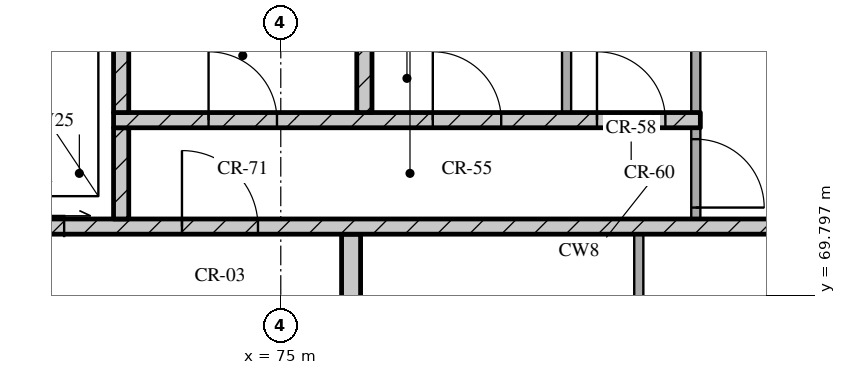
"""IFC4 building model, lengths in metres.
Left out: names, types, materials, properties, quantities, classifications, styles, units other than length and angle.
Written with IfcOpenShell. Run it as: python <this file> out.ifc"""

import sys

from ifc_helpers import new_model, si_unit, direction, frame, frame_2d, origin, place, context, subcontext, project, spatial, rectangle, extrude, element, fill, save


model = new_model("IFC4")
c1 = context("Model", 3, precision=1e-05, world=origin(), true_north=direction((0.0, 1.0)))
c2 = subcontext(c1, "Body", "Model", "MODEL_VIEW")
j1 = project(units=[si_unit("LENGTHUNIT", "METRE"), si_unit("PLANEANGLEUNIT", "RADIAN")], contexts=[c1])
p1 = place(None, origin())
s1 = spatial("IfcSite", under=j1, at=p1, CompositionType="ELEMENT")
p2 = place(p1, origin())
s2 = spatial("IfcBuilding", under=s1, at=p2, CompositionType="ELEMENT")
p3 = place(p2, frame((0.0, 0.0, 277.95)))
s3 = spatial("IfcBuildingStorey", under=s2, at=p3, CompositionType="ELEMENT", Elevation=277.95)
p4 = place(p3, frame((79.71, 68.0, 0.0), z_axis=(0.0, 0.0, 1.0), x_axis=(0.0, 1.0, 0.0)))
e1 = element("IfcWall", 1, at=p4, inside=s3, PredefinedType="PARTITIONING", context=c2, shape_type="SweptSolid", body=[
    extrude(rectangle(XDim=2.6, YDim=0.12, at=frame_2d((1.3, 0.0))), origin(), (0.0, 0.0, 1.0), 3.32),
])
p5 = place(p3, frame((75.925, 68.3, 0.0), z_axis=(0.0, 0.0, 1.0), x_axis=(0.0, 1.0, 0.0)))
e2 = element("IfcWall", 2, at=p5, inside=s3, PredefinedType="SOLIDWALL", context=c2, shape_type="SweptSolid", body=[
    extrude(rectangle(XDim=2.3, YDim=0.25, at=frame_2d((1.15, 0.0))), origin(), (0.0, 0.0, 1.0), 3.32),
])
p6 = place(p3, frame((67.8, 70.7, 0.0), z_axis=(0.0, 0.0, 1.0), x_axis=(1.0, 0.0, 0.0)))
e3 = element("IfcWall", 3, at=p6, inside=s3, PredefinedType="SOLIDWALL", context=c2, shape_type="SweptSolid", body=[
    extrude(rectangle(XDim=39.6, YDim=0.2, at=frame_2d((19.8, 0.0))), origin(), (0.0, 0.0, 1.0), 3.32),
])
p7 = place(p6, frame((0.65, 0.0, 0.0)))
e4 = element("IfcOpeningElement", 4, at=p7, cuts=e3, PredefinedType="OPENING", context=c2, shape_type="SweptSolid", body=[
    extrude(rectangle(XDim=1.1, YDim=2.1, at=frame_2d((0.55, 1.05))), frame((0.0, 0.11, 0.0), z_axis=(0.0, -1.0, 0.0), x_axis=(1.0, 0.0, 0.0)), (0.0, 0.0, 1.0), 0.22),
])
p8 = place(p6, frame((3.25, 0.0, 0.0)))
e5 = element("IfcOpeningElement", 5, at=p8, cuts=e3, PredefinedType="OPENING", context=c2, shape_type="SweptSolid", body=[
    extrude(rectangle(XDim=1.1, YDim=2.1, at=frame_2d((0.55, 1.05))), frame((0.0, 0.11, 0.0), z_axis=(0.0, -1.0, 0.0), x_axis=(1.0, 0.0, 0.0)), (0.0, 0.0, 1.0), 0.22),
])
p9 = place(p6, frame((5.9, 0.0, 0.0)))
e6 = element("IfcOpeningElement", 6, at=p9, cuts=e3, PredefinedType="OPENING", context=c2, shape_type="SweptSolid", body=[
    extrude(rectangle(XDim=1.0, YDim=2.1, at=frame_2d((0.5, 1.05))), frame((0.0, 0.11, 0.0), z_axis=(0.0, -1.0, 0.0), x_axis=(1.0, 0.0, 0.0)), (0.0, 0.0, 1.0), 0.22),
])
p10 = place(p6, frame((21.7, 0.0, 0.0)))
e7 = element("IfcOpeningElement", 7, at=p10, cuts=e3, PredefinedType="OPENING", context=c2, shape_type="SweptSolid", body=[
    extrude(rectangle(XDim=1.0, YDim=2.1, at=frame_2d((0.5, 1.05))), frame((0.0, 0.11, 0.0), z_axis=(0.0, -1.0, 0.0), x_axis=(1.0, 0.0, 0.0)), (0.0, 0.0, 1.0), 0.22),
])
p11 = place(p6, frame((32.7, 0.0, 0.0)))
e8 = element("IfcOpeningElement", 8, at=p11, cuts=e3, PredefinedType="OPENING", context=c2, shape_type="SweptSolid", body=[
    extrude(rectangle(XDim=1.0, YDim=2.1, at=frame_2d((0.5, 1.05))), frame((0.0, 0.11, 0.0), z_axis=(0.0, -1.0, 0.0), x_axis=(1.0, 0.0, 0.0)), (0.0, 0.0, 1.0), 0.22),
])
p12 = place(p6, frame((35.25, 0.0, 0.0)))
e9 = element("IfcOpeningElement", 9, at=p12, cuts=e3, PredefinedType="OPENING", context=c2, shape_type="SweptSolid", body=[
    extrude(rectangle(XDim=1.1, YDim=2.1, at=frame_2d((0.55, 1.05))), frame((0.0, 0.11, 0.0), z_axis=(0.0, -1.0, 0.0), x_axis=(1.0, 0.0, 0.0)), (0.0, 0.0, 1.0), 0.22),
])
p13 = place(p6, frame((37.85, 0.0, 0.0)))
e10 = element("IfcOpeningElement", 10, at=p13, cuts=e3, PredefinedType="OPENING", context=c2, shape_type="SweptSolid", body=[
    extrude(rectangle(XDim=1.1, YDim=2.1, at=frame_2d((0.55, 1.05))), frame((0.0, 0.11, 0.0), z_axis=(0.0, -1.0, 0.0), x_axis=(1.0, 0.0, 0.0)), (0.0, 0.0, 1.0), 0.22),
])
p14 = place(p3, frame((72.9, 70.8, 0.0), z_axis=(0.0, 0.0, 1.0), x_axis=(0.0, 1.0, 0.0)))
e11 = element("IfcWall", 11, at=p14, inside=s3, PredefinedType="SOLIDWALL", context=c2, shape_type="SweptSolid", body=[
    extrude(rectangle(XDim=1.2, YDim=0.2, at=frame_2d((0.6, 0.0))), origin(), (0.0, 0.0, 1.0), 3.32),
])
p15 = place(p3, frame((80.46, 70.8, 0.0), z_axis=(0.0, 0.0, 1.0), x_axis=(0.0, 1.0, 0.0)))
e12 = element("IfcWall", 12, at=p15, inside=s3, PredefinedType="PARTITIONING", context=c2, shape_type="SweptSolid", body=[
    extrude(rectangle(XDim=1.2, YDim=0.12, at=frame_2d((0.6, 0.0))), origin(), (0.0, 0.0, 1.0), 3.32),
])
p16 = place(p15, frame((0.15, 0.0, 0.0)))
e13 = element("IfcOpeningElement", 13, at=p16, cuts=e12, PredefinedType="OPENING", context=c2, shape_type="SweptSolid", body=[
    extrude(rectangle(XDim=0.9, YDim=2.1, at=frame_2d((0.45, 1.05))), frame((0.0, 0.07, 0.0), z_axis=(0.0, -1.0, 0.0), x_axis=(1.0, 0.0, 0.0)), (0.0, 0.0, 1.0), 0.14),
])
p17 = place(p3, frame((72.8, 72.1, 0.0), z_axis=(0.0, 0.0, 1.0), x_axis=(1.0, 0.0, 0.0)))
e14 = element("IfcWall", 14, at=p17, inside=s3, PredefinedType="SOLIDWALL", context=c2, shape_type="SweptSolid", body=[
    extrude(rectangle(XDim=7.72, YDim=0.2, at=frame_2d((3.86, 0.0))), origin(), (0.0, 0.0, 1.0), 3.32),
])
p18 = place(p17, frame((1.25, 0.0, 0.0)))
e15 = element("IfcOpeningElement", 15, at=p18, cuts=e14, PredefinedType="OPENING", context=c2, shape_type="SweptSolid", body=[
    extrude(rectangle(XDim=0.9, YDim=2.1, at=frame_2d((0.45, 1.05))), frame((0.0, 0.11, 0.0), z_axis=(0.0, -1.0, 0.0), x_axis=(1.0, 0.0, 0.0)), (0.0, 0.0, 1.0), 0.22),
])
p19 = place(p17, frame((4.2, 0.0, 0.0)))
e16 = element("IfcOpeningElement", 16, at=p19, cuts=e14, PredefinedType="OPENING", context=c2, shape_type="SweptSolid", body=[
    extrude(rectangle(XDim=0.9, YDim=2.1, at=frame_2d((0.45, 1.05))), frame((0.0, 0.11, 0.0), z_axis=(0.0, -1.0, 0.0), x_axis=(1.0, 0.0, 0.0)), (0.0, 0.0, 1.0), 0.22),
])
p20 = place(p17, frame((6.36, 0.0, 0.0)))
e17 = element("IfcOpeningElement", 17, at=p20, cuts=e14, PredefinedType="OPENING", context=c2, shape_type="SweptSolid", body=[
    extrude(rectangle(XDim=0.9, YDim=2.1, at=frame_2d((0.45, 1.05))), frame((0.0, 0.11, 0.0), z_axis=(0.0, -1.0, 0.0), x_axis=(1.0, 0.0, 0.0)), (0.0, 0.0, 1.0), 0.22),
])
for number, where, z_axis, x_axis in (
    (18, (72.9, 72.2, 0.0), (0.0, 0.0, 1.0), (0.0, 1.0, 0.0)),
    (19, (76.1, 72.2, 0.0), (0.0, 0.0, 1.0), (0.0, 1.0, 0.0)),
):
    element("IfcWall", number, at=place(p3, frame(where, z_axis=z_axis, x_axis=x_axis)), inside=s3, PredefinedType="SOLIDWALL", context=c2, shape_type="SweptSolid", body=[
        extrude(rectangle(XDim=2.2, YDim=0.2, at=frame_2d((1.1, 0.0))), origin(), (0.0, 0.0, 1.0), 3.32),
    ])
for number, where, z_axis, x_axis in (
    (20, (78.76, 72.2, 0.0), (0.0, 0.0, 1.0), (0.0, 1.0, 0.0)),
    (21, (80.46, 72.2, 0.0), (0.0, 0.0, 1.0), (0.0, 1.0, 0.0)),
):
    element("IfcWall", number, at=place(p3, frame(where, z_axis=z_axis, x_axis=x_axis)), inside=s3, PredefinedType="PARTITIONING", context=c2, shape_type="SweptSolid", body=[
        extrude(rectangle(XDim=2.2, YDim=0.12, at=frame_2d((1.1, 0.0))), origin(), (0.0, 0.0, 1.0), 3.32),
    ])
p21 = place(p8, origin())
e22 = element("IfcDoor", 22, at=p21, inside=s3, OperationType="SLIDING_TO_RIGHT", PredefinedType="DOOR", context=c2, shape_type="SweptSolid", body=[
    extrude(rectangle(XDim=1.1, YDim=2.1, at=frame_2d((0.55, 1.05))), frame((0.0, 0.025, 0.0), z_axis=(0.0, -1.0, 0.0), x_axis=(1.0, 0.0, 0.0)), (0.0, 0.0, 1.0), 0.05),
])
fill(e5, e22)
p22 = place(p9, origin())
e23 = element("IfcDoor", 23, at=p22, inside=s3, OperationType="SINGLE_SWING_LEFT", PredefinedType="DOOR", context=c2, shape_type="SweptSolid", body=[
    extrude(rectangle(XDim=1.0, YDim=2.1, at=frame_2d((0.5, 1.05))), frame((0.0, 0.025, 0.0), z_axis=(0.0, -1.0, 0.0), x_axis=(1.0, 0.0, 0.0)), (0.0, 0.0, 1.0), 0.05),
])
fill(e6, e23)
p23 = place(p16, origin())
e24 = element("IfcDoor", 24, at=p23, inside=s3, OperationType="SINGLE_SWING_RIGHT", PredefinedType="DOOR", context=c2, shape_type="SweptSolid", body=[
    extrude(rectangle(XDim=0.9, YDim=2.1, at=frame_2d((0.45, 1.05))), frame((0.0, 0.025, 0.0), z_axis=(0.0, -1.0, 0.0), x_axis=(1.0, 0.0, 0.0)), (0.0, 0.0, 1.0), 0.05),
])
fill(e13, e24)
p24 = place(p18, origin())
e25 = element("IfcDoor", 25, at=p24, inside=s3, OperationType="SINGLE_SWING_LEFT", PredefinedType="DOOR", context=c2, shape_type="SweptSolid", body=[
    extrude(rectangle(XDim=0.9, YDim=2.1, at=frame_2d((0.45, 1.05))), frame((0.0, 0.025, 0.0), z_axis=(0.0, -1.0, 0.0), x_axis=(1.0, 0.0, 0.0)), (0.0, 0.0, 1.0), 0.05),
])
fill(e15, e25)
p25 = place(p19, origin())
e26 = element("IfcDoor", 26, at=p25, inside=s3, OperationType="SINGLE_SWING_LEFT", PredefinedType="DOOR", context=c2, shape_type="SweptSolid", body=[
    extrude(rectangle(XDim=0.9, YDim=2.1, at=frame_2d((0.45, 1.05))), frame((0.0, 0.025, 0.0), z_axis=(0.0, -1.0, 0.0), x_axis=(1.0, 0.0, 0.0)), (0.0, 0.0, 1.0), 0.05),
])
fill(e16, e26)
p26 = place(p20, origin())
e27 = element("IfcDoor", 27, at=p26, inside=s3, OperationType="SINGLE_SWING_LEFT", PredefinedType="DOOR", context=c2, shape_type="SweptSolid", body=[
    extrude(rectangle(XDim=0.9, YDim=2.1, at=frame_2d((0.45, 1.05))), frame((0.0, 0.025, 0.0), z_axis=(0.0, -1.0, 0.0), x_axis=(1.0, 0.0, 0.0)), (0.0, 0.0, 1.0), 0.05),
])
fill(e17, e27)
save(model, sys.argv[1])
